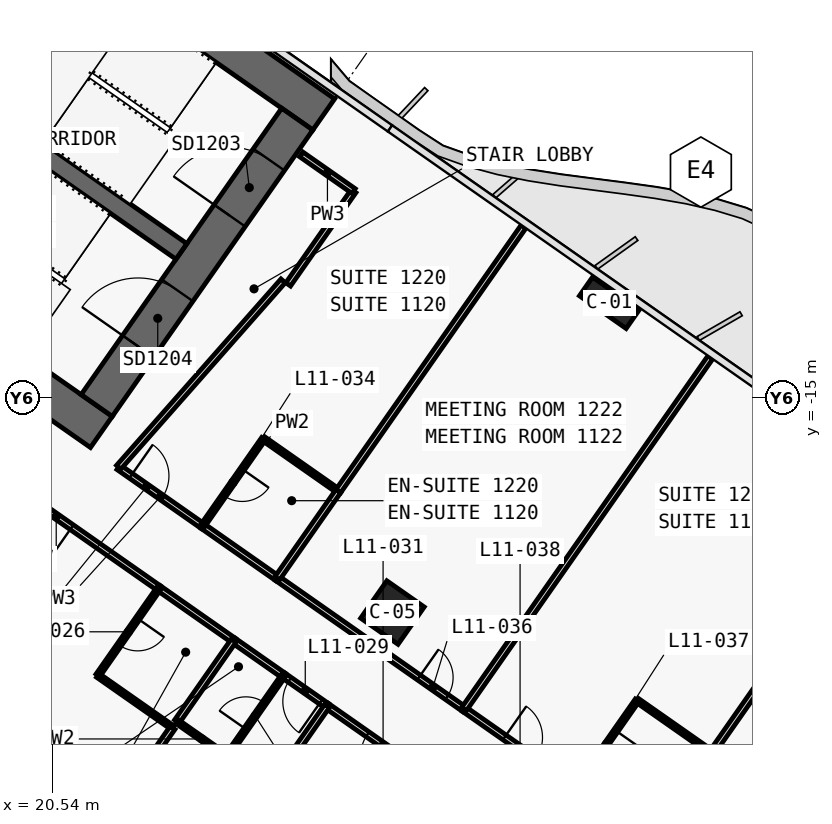
"""IFC4 building model, lengths in metres.
Left out: names, types, materials, properties, quantities, classifications, styles, units other than length and angle.
Written with IfcOpenShell. Run it as: python <this file> out.ifc"""

import sys

from ifc_helpers import new_model, si_unit, direction, frame, frame_2d, origin, origin_2d, place, context, subcontext, project, spatial, polyline, rectangle, outline, extrude, element, fill, save


model = new_model("IFC4")
c1 = context("Model", 3, precision=1e-05, world=origin(), true_north=direction((0.0, 1.0)))
c2 = subcontext(c1, "Body", "Model", "MODEL_VIEW")
j1 = project(units=[si_unit("LENGTHUNIT", "METRE"), si_unit("PLANEANGLEUNIT", "RADIAN")], contexts=[c1])
p1 = place(None, origin())
s1 = spatial("IfcSite", under=j1, at=p1, CompositionType="ELEMENT")
p2 = place(p1, origin())
s2 = spatial("IfcBuilding", under=s1, at=p2, CompositionType="ELEMENT")
p3 = place(p2, frame((0.0, 0.0, 65.3)))
s3 = spatial("IfcBuildingStorey", under=s2, at=p3, CompositionType="ELEMENT", Elevation=65.3)
p4 = place(p3, frame((-0.037, 11.867, 0.0), z_axis=(0.0, 0.0, 1.0), x_axis=(0.819155306259, -0.573571777746, 0.0)))
e1 = element("IfcWall", 1, at=p4, inside=s3, PredefinedType="SHEAR", context=c2, shape_type="SweptSolid", body=[
    extrude(outline(polyline([(33.837, 0.5), (0.0, 0.5), (0.7, -0.5), (33.837, -0.5), (33.837, 0.5)])), origin(), (0.0, 0.0, 1.0), 3.6),
])
p5 = place(p3, frame((-0.037, -0.585, 0.0), z_axis=(0.0, 0.0, 1.0), x_axis=(0.819157152511, -0.573569140985, 0.0)))
e2 = element("IfcWall", 2, at=p5, inside=s3, PredefinedType="SHEAR", context=c2, shape_type="SweptSolid", body=[
    extrude(outline(polyline([(26.695, 0.5), (0.0, 0.5), (0.7, -0.5), (26.695, -0.5), (26.695, 0.5)])), origin(), (0.0, 0.0, 1.0), 3.6),
])
p6 = place(p5, frame((1.245, 0.0, 0.0)))
e3 = element("IfcOpeningElement", 3, at=p6, cuts=e2, PredefinedType="OPENING", context=c2, shape_type="SweptSolid", body=[
    extrude(rectangle(XDim=1.5, YDim=2.1, at=frame_2d((0.75, 1.05))), frame((0.0, 0.51, 0.0), z_axis=(0.0, -1.0, 0.0), x_axis=(1.0, 0.0, 0.0)), (0.0, 0.0, 1.0), 1.02),
])
p7 = place(p5, frame((12.445, 0.0, 0.0)))
e4 = element("IfcOpeningElement", 4, at=p7, cuts=e2, PredefinedType="OPENING", context=c2, shape_type="SweptSolid", body=[
    extrude(rectangle(XDim=1.5, YDim=2.1, at=frame_2d((0.75, 1.05))), frame((0.0, 0.51, 0.0), z_axis=(0.0, -1.0, 0.0), x_axis=(1.0, 0.0, 0.0)), (0.0, 0.0, 1.0), 1.02),
])
p8 = place(p3, frame((21.708, -15.2, 0.0), z_axis=(0.0, 0.0, 1.0), x_axis=(0.573576324356, 0.819152122709, 0.0)))
e5 = element("IfcWall", 5, at=p8, inside=s3, PredefinedType="SHEAR", context=c2, shape_type="SweptSolid", body=[
    extrude(outline(polyline([(9.2, 0.5), (0.0, 0.5), (0.0, -0.5), (9.2, -0.5), (9.2, 0.5)])), origin(), (0.0, 0.0, 1.0), 3.6),
])
p9 = place(p8, frame((6.1, 0.0, 0.0)))
e6 = element("IfcOpeningElement", 6, at=p9, cuts=e5, PredefinedType="OPENING", context=c2, shape_type="SweptSolid", body=[
    extrude(rectangle(XDim=1.8, YDim=2.1, at=frame_2d((0.9, 1.05))), frame((0.0, 0.51, 0.0), z_axis=(0.0, -1.0, 0.0), x_axis=(1.0, 0.0, 0.0)), (0.0, 0.0, 1.0), 1.02),
])
p10 = place(p8, frame((1.9, 0.0, 0.0)))
e7 = element("IfcOpeningElement", 7, at=p10, cuts=e5, PredefinedType="OPENING", context=c2, shape_type="SweptSolid", body=[
    extrude(rectangle(XDim=1.8, YDim=2.1, at=frame_2d((0.9, 1.05))), frame((0.0, 0.51, 0.0), z_axis=(0.0, -1.0, 0.0), x_axis=(1.0, 0.0, 0.0)), (0.0, 0.0, 1.0), 1.02),
])
p11 = place(p3, frame((2.638, 3.768, 0.0), z_axis=(0.0, 0.0, 1.0), x_axis=(0.819148977158, -0.573580816643, 0.0)))
e8 = element("IfcWall", 8, at=p11, inside=s3, PredefinedType="SHEAR", context=c2, shape_type="SweptSolid", body=[
    extrude(outline(polyline([(0.0, 0.25), (0.0, -0.25), (26.0, -0.25), (26.0, 0.25), (0.0, 0.25)])), origin(), (0.0, 0.0, 1.0), 3.6),
])
p12 = place(p11, frame((9.637, 0.0, 0.0)))
e9 = element("IfcOpeningElement", 9, at=p12, cuts=e8, PredefinedType="OPENING", context=c2, shape_type="SweptSolid", body=[
    extrude(rectangle(XDim=1.2, YDim=2.1, at=frame_2d((0.6, 1.05))), frame((0.0, 0.26, 0.0), z_axis=(0.0, -1.0, 0.0), x_axis=(1.0, 0.0, 0.0)), (0.0, 0.0, 1.0), 0.52),
])
p13 = place(p11, frame((11.812, 0.0, 0.0)))
e10 = element("IfcOpeningElement", 10, at=p13, cuts=e8, PredefinedType="OPENING", context=c2, shape_type="SweptSolid", body=[
    extrude(rectangle(XDim=1.2, YDim=2.1, at=frame_2d((0.6, 1.05))), frame((0.0, 0.26, 0.0), z_axis=(0.0, -1.0, 0.0), x_axis=(1.0, 0.0, 0.0)), (0.0, 0.0, 1.0), 0.52),
])
p14 = place(p11, frame((13.988, 0.0, 0.0)))
e11 = element("IfcOpeningElement", 11, at=p14, cuts=e8, PredefinedType="OPENING", context=c2, shape_type="SweptSolid", body=[
    extrude(rectangle(XDim=1.2, YDim=2.1, at=frame_2d((0.6, 1.05))), frame((0.0, 0.26, 0.0), z_axis=(0.0, -1.0, 0.0), x_axis=(1.0, 0.0, 0.0)), (0.0, 0.0, 1.0), 0.52),
])
p15 = place(p11, frame((16.262, 0.0, 0.0)))
e12 = element("IfcOpeningElement", 12, at=p15, cuts=e8, PredefinedType="OPENING", context=c2, shape_type="SweptSolid", body=[
    extrude(rectangle(XDim=1.0, YDim=2.1, at=frame_2d((0.5, 1.05))), frame((0.0, 0.26, 0.0), z_axis=(0.0, -1.0, 0.0), x_axis=(1.0, 0.0, 0.0)), (0.0, 0.0, 1.0), 0.52),
])
p16 = place(p3, frame((35.197, -12.498, 0.0), z_axis=(0.0, 0.0, 1.0), x_axis=(0.819152044289, -0.573576436351, 0.0)))
e13 = element("IfcColumn", 13, at=p16, inside=s3, PredefinedType="COLUMN", context=c2, shape_type="SweptSolid", body=[
    extrude(rectangle(XDim=1.5, YDim=0.6, at=origin_2d()), origin(), (0.0, 0.0, 1.0), 3.6),
])
p17 = place(p3, frame((29.49, -20.649, 0.0), z_axis=(0.0, 0.0, 1.0), x_axis=(0.819152044289, -0.573576436351, 0.0)))
e14 = element("IfcColumn", 14, at=p17, inside=s3, PredefinedType="COLUMN", context=c2, shape_type="SweptSolid", body=[
    extrude(rectangle(XDim=1.2, YDim=1.2, at=origin_2d()), origin(), (0.0, 0.0, 1.0), 3.6),
])
p18 = place(p3, frame((22.284, -16.824, 0.0), z_axis=(0.0, 0.0, 1.0), x_axis=(0.819176640776, -0.573541307325, 0.0)))
e15 = element("IfcWall", 15, at=p18, inside=s3, PredefinedType="PARTITIONING", context=c2, shape_type="SweptSolid", body=[
    extrude(rectangle(XDim=2.698, YDim=0.15, at=frame_2d((1.349, 0.0))), origin(), (0.0, 0.0, 1.0), 3.32),
])
p19 = place(p18, frame((0.396, 0.0, 0.0)))
e16 = element("IfcOpeningElement", 16, at=p19, cuts=e15, PredefinedType="OPENING", context=c2, shape_type="SweptSolid", body=[
    extrude(rectangle(XDim=1.0, YDim=2.1, at=frame_2d((0.5, 1.05))), frame((0.0, 0.085, 0.0), z_axis=(0.0, -1.0, 0.0), x_axis=(1.0, 0.0, 0.0)), (0.0, 0.0, 1.0), 0.17),
])
p20 = place(p3, frame((24.491, -18.369, 0.0), z_axis=(0.0, 0.0, 1.0), x_axis=(0.819179439794, -0.573537309527, 0.0)))
e17 = element("IfcWall", 17, at=p20, inside=s3, PredefinedType="PARTITIONING", context=c2, shape_type="SweptSolid", body=[
    extrude(rectangle(XDim=2.404, YDim=0.15, at=frame_2d((1.202, 0.0))), origin(), (0.0, 0.0, 1.0), 3.32),
])
p21 = place(p3, frame((26.457, -19.746, 0.0), z_axis=(0.0, 0.0, 1.0), x_axis=(0.819165052243, -0.573557858619, 0.0)))
e18 = element("IfcWall", 18, at=p21, inside=s3, PredefinedType="PARTITIONING", context=c2, shape_type="SweptSolid", body=[
    extrude(rectangle(XDim=6.004, YDim=0.15, at=frame_2d((3.002, 0.0))), origin(), (0.0, 0.0, 1.0), 2.6),
])
p22 = place(p21, frame((4.552, 0.0, 0.0)))
e19 = element("IfcOpeningElement", 19, at=p22, cuts=e18, PredefinedType="OPENING", context=c2, shape_type="SweptSolid", body=[
    extrude(rectangle(XDim=0.9, YDim=2.1, at=frame_2d((0.45, 1.05))), frame((0.0, 0.085, 0.0), z_axis=(0.0, -1.0, 0.0), x_axis=(1.0, 0.0, 0.0)), (0.0, 0.0, 1.0), 0.17),
])
p23 = place(p3, frame((31.372, -23.188, 0.0), z_axis=(0.0, 0.0, 1.0), x_axis=(0.819145961204, -0.573585123798, 0.0)))
e20 = element("IfcWall", 20, at=p23, inside=s3, PredefinedType="PARTITIONING", context=c2, shape_type="SweptSolid", body=[
    extrude(rectangle(XDim=3.603, YDim=0.15, at=frame_2d((1.802, 0.0))), origin(), (0.0, 0.0, 1.0), 3.32),
])
p24 = place(p23, frame((1.302, 0.0, 0.0)))
e21 = element("IfcOpeningElement", 21, at=p24, cuts=e20, PredefinedType="OPENING", context=c2, shape_type="SweptSolid", body=[
    extrude(rectangle(XDim=1.0, YDim=2.1, at=frame_2d((0.5, 1.05))), frame((0.0, 0.085, 0.0), z_axis=(0.0, -1.0, 0.0), x_axis=(1.0, 0.0, 0.0)), (0.0, 0.0, 1.0), 0.17),
])
p25 = place(p3, frame((23.346, -20.01, 0.0), z_axis=(0.0, 0.0, 1.0), x_axis=(-0.819153746897, 0.573574004767, 0.0)))
e22 = element("IfcWall", 22, at=p25, inside=s3, PredefinedType="PARTITIONING", context=c2, shape_type="SweptSolid", body=[
    extrude(rectangle(XDim=6.603, YDim=0.15, at=frame_2d((3.302, 0.0))), origin(), (0.0, 0.0, 1.0), 2.6),
])
p26 = place(p25, frame((2.801, 0.0, 0.0)))
e23 = element("IfcOpeningElement", 23, at=p26, cuts=e22, PredefinedType="OPENING", context=c2, shape_type="SweptSolid", body=[
    extrude(rectangle(XDim=1.0, YDim=2.1, at=frame_2d((0.5, 1.05))), frame((0.0, 0.085, 0.0), z_axis=(0.0, -1.0, 0.0), x_axis=(1.0, 0.0, 0.0)), (0.0, 0.0, 1.0), 0.17),
])
p27 = place(p3, frame((25.313, -21.387, 0.0), z_axis=(0.0, 0.0, 1.0), x_axis=(-0.819146032251, 0.573585022335, 0.0)))
e24 = element("IfcWall", 24, at=p27, inside=s3, PredefinedType="PARTITIONING", context=c2, shape_type="SweptSolid", body=[
    extrude(rectangle(XDim=2.404, YDim=0.15, at=frame_2d((1.202, 0.0))), origin(), (0.0, 0.0, 1.0), 3.32),
])
p28 = place(p3, frame((27.771, -23.107, 0.0), z_axis=(0.0, 0.0, 1.0), x_axis=(-0.819117471667, 0.573625808005, 0.0)))
e25 = element("IfcWall", 25, at=p28, inside=s3, PredefinedType="PARTITIONING", context=c2, shape_type="SweptSolid", body=[
    extrude(rectangle(XDim=1.403, YDim=0.15, at=frame_2d((0.702, 0.0))), origin(), (0.0, 0.0, 1.0), 2.6),
])
p29 = place(p28, frame((0.202, 0.0, 0.0)))
e26 = element("IfcOpeningElement", 26, at=p29, cuts=e25, PredefinedType="OPENING", context=c2, shape_type="SweptSolid", body=[
    extrude(rectangle(XDim=1.0, YDim=2.1, at=frame_2d((0.5, 1.05))), frame((0.0, 0.085, 0.0), z_axis=(0.0, -1.0, 0.0), x_axis=(1.0, 0.0, 0.0)), (0.0, 0.0, 1.0), 0.17),
])
p30 = place(p3, frame((26.624, -22.304, 0.0), z_axis=(0.0, 0.0, 1.0), x_axis=(-0.819189013667, 0.573523634986, 0.0)))
e27 = element("IfcWall", 27, at=p30, inside=s3, PredefinedType="PARTITIONING", context=c2, shape_type="SweptSolid", body=[
    extrude(rectangle(XDim=1.604, YDim=0.15, at=frame_2d((0.802, 0.0))), origin(), (0.0, 0.0, 1.0), 3.32),
])
p31 = place(p3, frame((30.719, -25.172, 0.0), z_axis=(0.0, 0.0, 1.0), x_axis=(-0.819145961204, 0.573585123798, 0.0)))
e28 = element("IfcWall", 28, at=p31, inside=s3, PredefinedType="PARTITIONING", context=c2, shape_type="SweptSolid", body=[
    extrude(rectangle(XDim=3.603, YDim=0.15, at=frame_2d((1.802, 0.0))), origin(), (0.0, 0.0, 1.0), 2.6),
])
p32 = place(p31, frame((1.301, 0.0, 0.0)))
e29 = element("IfcOpeningElement", 29, at=p32, cuts=e28, PredefinedType="OPENING", context=c2, shape_type="SweptSolid", body=[
    extrude(rectangle(XDim=1.0, YDim=2.1, at=frame_2d((0.5, 1.05))), frame((0.0, 0.085, 0.0), z_axis=(0.0, -1.0, 0.0), x_axis=(1.0, 0.0, 0.0)), (0.0, 0.0, 1.0), 0.17),
])
p33 = place(p3, frame((26.098, -16.076, 0.0), z_axis=(0.0, 0.0, 1.0), x_axis=(-0.573550118428, -0.819170471667, 0.0)))
e30 = element("IfcWall", 30, at=p33, inside=s3, PredefinedType="PARTITIONING", context=c2, shape_type="SweptSolid", body=[
    extrude(rectangle(XDim=2.8, YDim=0.12, at=frame_2d((1.4, 0.0))), origin(), (0.0, 0.0, 1.0), 2.6),
])
p34 = place(p33, frame((0.975, 0.0, 0.0)))
e31 = element("IfcOpeningElement", 31, at=p34, cuts=e30, PredefinedType="OPENING", context=c2, shape_type="SweptSolid", body=[
    extrude(rectangle(XDim=0.85, YDim=2.05, at=frame_2d((0.425, 1.025))), frame((0.0, 0.07, 0.0), z_axis=(0.0, -1.0, 0.0), x_axis=(1.0, 0.0, 0.0)), (0.0, 0.0, 1.0), 0.14),
])
p35 = place(p3, frame((28.065, -17.453, 0.0), z_axis=(0.0, 0.0, 1.0), x_axis=(-0.819155442668, 0.573571582932, 0.0)))
e32 = element("IfcWall", 32, at=p35, inside=s3, PredefinedType="PARTITIONING", context=c2, shape_type="SweptSolid", body=[
    extrude(rectangle(XDim=2.4, YDim=0.12, at=frame_2d((1.2, 0.0))), origin(), (0.0, 0.0, 1.0), 3.32),
])
p36 = place(p3, frame((32.94, -10.491, 0.0), z_axis=(0.0, 0.0, 1.0), x_axis=(-0.573593433868, -0.819140142237, 0.0)))
e33 = element("IfcWall", 33, at=p36, inside=s3, PredefinedType="PARTITIONING", context=c2, shape_type="SweptSolid", body=[
    extrude(rectangle(XDim=8.499, YDim=0.15, at=frame_2d((4.25, 0.0))), origin(), (0.0, 0.0, 1.0), 2.6),
])
p37 = place(p3, frame((22.285, -16.825, 0.0), z_axis=(0.0, 0.0, 1.0), x_axis=(0.661551268245, 0.749899939647, 0.0)))
e34 = element("IfcWall", 34, at=p37, inside=s3, PredefinedType="PARTITIONING", context=c2, shape_type="SweptSolid", body=[
    extrude(rectangle(XDim=6.541, YDim=0.15, at=frame_2d((3.271, 0.0))), origin(), (0.0, 0.0, 1.0), 2.6),
])
p38 = place(p3, frame((26.746, -12.014, 0.0), z_axis=(0.0, 0.0, 1.0), x_axis=(0.573560650686, 0.819163097304, 0.0)))
e35 = element("IfcWall", 35, at=p38, inside=s3, PredefinedType="PARTITIONING", context=c2, shape_type="SweptSolid", body=[
    extrude(rectangle(XDim=3.0, YDim=0.15, at=frame_2d((1.5, 0.0))), origin(), (0.0, 0.0, 1.0), 3.32),
])
p39 = place(p3, frame((28.467, -9.556, 0.0), z_axis=(0.0, 0.0, 1.0), x_axis=(-0.819109000826, 0.573637903879, 0.0)))
e36 = element("IfcWall", 36, at=p39, inside=s3, PredefinedType="PARTITIONING", context=c2, shape_type="SweptSolid", body=[
    extrude(rectangle(XDim=1.68, YDim=0.15, at=frame_2d((0.84, 0.0))), origin(), (0.0, 0.0, 1.0), 3.32),
])
p40 = place(p3, frame((28.064, -17.454, 0.0), z_axis=(0.0, 0.0, 1.0), x_axis=(-0.573550118428, -0.819170471667, 0.0)))
e37 = element("IfcWall", 37, at=p40, inside=s3, PredefinedType="PARTITIONING", context=c2, shape_type="SweptSolid", body=[
    extrude(rectangle(XDim=2.8, YDim=0.15, at=frame_2d((1.4, 0.0))), origin(), (0.0, 0.0, 1.0), 2.6),
])
p41 = place(p3, frame((37.855, -13.932, 0.0), z_axis=(0.0, 0.0, 1.0), x_axis=(-0.573571089604, -0.819155788095, 0.0)))
e38 = element("IfcWall", 38, at=p41, inside=s3, PredefinedType="PARTITIONING", context=c2, shape_type="SweptSolid", body=[
    extrude(rectangle(XDim=11.3, YDim=0.15, at=frame_2d((5.65, 0.0))), origin(), (0.0, 0.0, 1.0), 2.5),
])
p42 = place(p3, frame((37.895, -24.336, 0.0), z_axis=(0.0, 0.0, 1.0), x_axis=(-0.819141114317, 0.573592045652, 0.0)))
e39 = element("IfcWall", 39, at=p42, inside=s3, PredefinedType="PARTITIONING", context=c2, shape_type="SweptSolid", body=[
    extrude(rectangle(XDim=2.4, YDim=0.12, at=frame_2d((1.2, 0.0))), origin(), (0.0, 0.0, 1.0), 3.32),
])
p43 = place(p3, frame((35.927, -22.959, 0.0), z_axis=(0.0, 0.0, 1.0), x_axis=(-0.573550118428, -0.819170471667, 0.0)))
e40 = element("IfcWall", 40, at=p43, inside=s3, PredefinedType="PARTITIONING", context=c2, shape_type="SweptSolid", body=[
    extrude(rectangle(XDim=2.8, YDim=0.12, at=frame_2d((1.4, 0.0))), origin(), (0.0, 0.0, 1.0), 2.6),
])
p44 = place(p43, frame((0.975, 0.0, 0.0)))
e41 = element("IfcOpeningElement", 41, at=p44, cuts=e40, PredefinedType="OPENING", context=c2, shape_type="SweptSolid", body=[
    extrude(rectangle(XDim=0.85, YDim=2.05, at=frame_2d((0.425, 1.025))), frame((0.0, 0.07, 0.0), z_axis=(0.0, -1.0, 0.0), x_axis=(1.0, 0.0, 0.0)), (0.0, 0.0, 1.0), 0.14),
])
p45 = place(p3, frame((41.049, -19.831, 0.0), z_axis=(0.0, 0.0, 1.0), x_axis=(-0.573530875885, -0.819183944183, 0.0)))
e42 = element("IfcWall", 42, at=p45, inside=s3, PredefinedType="PARTITIONING", context=c2, shape_type="SweptSolid", body=[
    extrude(rectangle(XDim=5.499, YDim=0.15, at=frame_2d((2.75, 0.0))), origin(), (0.0, 0.0, 1.0), 3.32),
])
p46 = place(p3, frame((23.344, -20.008, 0.0), z_axis=(0.0, 0.0, 1.0), x_axis=(-0.573550118428, -0.819170471667, 0.0)))
e43 = element("IfcWall", 43, at=p46, inside=s3, PredefinedType="PARTITIONING", context=c2, shape_type="SweptSolid", body=[
    extrude(rectangle(XDim=2.8, YDim=0.12, at=frame_2d((1.4, 0.0))), origin(), (0.0, 0.0, 1.0), 3.32),
])
p47 = place(p46, frame((0.975, 0.0, 0.0)))
e44 = element("IfcOpeningElement", 44, at=p47, cuts=e43, PredefinedType="OPENING", context=c2, shape_type="SweptSolid", body=[
    extrude(rectangle(XDim=0.85, YDim=2.05, at=frame_2d((0.425, 1.025))), frame((0.0, 0.07, 0.0), z_axis=(0.0, -1.0, 0.0), x_axis=(1.0, 0.0, 0.0)), (0.0, 0.0, 1.0), 0.14),
])
p48 = place(p3, frame((21.739, -22.303, 0.0), z_axis=(0.0, 0.0, 1.0), x_axis=(0.819107643868, -0.573639841501, 0.0)))
e45 = element("IfcWall", 45, at=p48, inside=s3, PredefinedType="PARTITIONING", context=c2, shape_type="SweptSolid", body=[
    extrude(rectangle(XDim=2.4, YDim=0.12, at=frame_2d((1.2, 0.0))), origin(), (0.0, 0.0, 1.0), 3.32),
])
p49 = place(p3, frame((23.705, -23.68, 0.0), z_axis=(0.0, 0.0, 1.0), x_axis=(-0.573553393703, -0.819168178442, 0.0)))
e46 = element("IfcWall", 46, at=p49, inside=s3, PredefinedType="PARTITIONING", context=c2, shape_type="SweptSolid", body=[
    extrude(rectangle(XDim=4.499, YDim=0.15, at=frame_2d((2.25, 0.0))), origin(), (0.0, 0.0, 1.0), 2.5),
])
p50 = place(p3, frame((25.311, -21.385, 0.0), z_axis=(0.0, 0.0, 1.0), x_axis=(-0.573588285102, -0.819143747577, 0.0)))
e47 = element("IfcWall", 47, at=p50, inside=s3, PredefinedType="PARTITIONING", context=c2, shape_type="SweptSolid", body=[
    extrude(rectangle(XDim=2.602, YDim=0.15, at=frame_2d((1.301, 0.0))), origin(), (0.0, 0.0, 1.0), 3.32),
])
p51 = place(p3, frame((23.819, -23.516, 0.0), z_axis=(0.0, 0.0, 1.0), x_axis=(0.81918174131, -0.573534022273, 0.0)))
e48 = element("IfcWall", 48, at=p51, inside=s3, PredefinedType="PARTITIONING", context=c2, shape_type="SweptSolid", body=[
    extrude(rectangle(XDim=1.6, YDim=0.12, at=frame_2d((0.8, 0.0))), origin(), (0.0, 0.0, 1.0), 3.32),
])
p52 = place(p3, frame((25.132, -24.434, 0.0), z_axis=(0.0, 0.0, 1.0), x_axis=(0.573537965655, 0.819178980414, 0.0)))
e49 = element("IfcWall", 49, at=p52, inside=s3, PredefinedType="PARTITIONING", context=c2, shape_type="SweptSolid", body=[
    extrude(rectangle(XDim=2.6, YDim=0.12, at=frame_2d((1.3, 0.0))), origin(), (0.0, 0.0, 1.0), 3.32),
])
p53 = place(p52, frame((0.875, 0.0, 0.0)))
e50 = element("IfcOpeningElement", 50, at=p53, cuts=e49, PredefinedType="OPENING", context=c2, shape_type="SweptSolid", body=[
    extrude(rectangle(XDim=0.85, YDim=2.05, at=frame_2d((0.425, 1.025))), frame((0.0, 0.07, 0.0), z_axis=(0.0, -1.0, 0.0), x_axis=(1.0, 0.0, 0.0)), (0.0, 0.0, 1.0), 0.14),
])
p54 = place(p3, frame((27.769, -23.106, 0.0), z_axis=(0.0, 0.0, 1.0), x_axis=(-0.57359826181, -0.819136761505, 0.0)))
e51 = element("IfcWall", 51, at=p54, inside=s3, PredefinedType="PARTITIONING", context=c2, shape_type="SweptSolid", body=[
    extrude(rectangle(XDim=6.63, YDim=0.15, at=frame_2d((3.315, 0.0))), origin(), (0.0, 0.0, 1.0), 2.6),
])
p55 = place(p9, origin())
e52 = element("IfcDoor", 52, at=p55, inside=s3, OperationType="DOUBLE_DOOR_SINGLE_SWING", PredefinedType="DOOR", context=c2, shape_type="SweptSolid", body=[
    extrude(rectangle(XDim=1.8, YDim=2.1, at=frame_2d((0.9, 1.05))), frame((0.0, 0.025, 0.0), z_axis=(0.0, -1.0, 0.0), x_axis=(1.0, 0.0, 0.0)), (0.0, 0.0, 1.0), 0.05),
])
fill(e6, e52)
p56 = place(p10, origin())
e53 = element("IfcDoor", 53, at=p56, inside=s3, OperationType="DOUBLE_DOOR_SINGLE_SWING", PredefinedType="DOOR", context=c2, shape_type="SweptSolid", body=[
    extrude(rectangle(XDim=1.8, YDim=2.1, at=frame_2d((0.9, 1.05))), frame((0.0, 0.025, 0.0), z_axis=(0.0, -1.0, 0.0), x_axis=(1.0, 0.0, 0.0)), (0.0, 0.0, 1.0), 0.05),
])
fill(e7, e53)
p57 = place(p47, origin())
e54 = element("IfcDoor", 54, at=p57, inside=s3, OperationType="SINGLE_SWING_RIGHT", PredefinedType="DOOR", context=c2, shape_type="SweptSolid", body=[
    extrude(rectangle(XDim=0.85, YDim=2.05, at=frame_2d((0.425, 1.025))), frame((0.0, 0.025, 0.0), z_axis=(0.0, -1.0, 0.0), x_axis=(1.0, 0.0, 0.0)), (0.0, 0.0, 1.0), 0.05),
])
fill(e44, e54)
p58 = place(p26, origin())
e55 = element("IfcDoor", 55, at=p58, inside=s3, OperationType="SINGLE_SWING_RIGHT", PredefinedType="DOOR", context=c2, shape_type="SweptSolid", body=[
    extrude(rectangle(XDim=1.0, YDim=2.1, at=frame_2d((0.5, 1.05))), frame((0.0, 0.025, 0.0), z_axis=(0.0, -1.0, 0.0), x_axis=(1.0, 0.0, 0.0)), (0.0, 0.0, 1.0), 0.05),
])
fill(e23, e55)
p59 = place(p53, origin())
e56 = element("IfcDoor", 56, at=p59, inside=s3, OperationType="SINGLE_SWING_LEFT", PredefinedType="DOOR", context=c2, shape_type="SweptSolid", body=[
    extrude(rectangle(XDim=0.85, YDim=2.05, at=frame_2d((0.425, 1.025))), frame((0.0, 0.025, 0.0), z_axis=(0.0, -1.0, 0.0), x_axis=(1.0, 0.0, 0.0)), (0.0, 0.0, 1.0), 0.05),
])
fill(e50, e56)
p60 = place(p29, origin())
e57 = element("IfcDoor", 57, at=p60, inside=s3, OperationType="SINGLE_SWING_RIGHT", PredefinedType="DOOR", context=c2, shape_type="SweptSolid", body=[
    extrude(rectangle(XDim=1.0, YDim=2.1, at=frame_2d((0.5, 1.05))), frame((0.0, 0.025, 0.0), z_axis=(0.0, -1.0, 0.0), x_axis=(1.0, 0.0, 0.0)), (0.0, 0.0, 1.0), 0.05),
])
fill(e26, e57)
p61 = place(p32, origin())
e58 = element("IfcDoor", 58, at=p61, inside=s3, OperationType="SINGLE_SWING_LEFT", PredefinedType="DOOR", context=c2, shape_type="SweptSolid", body=[
    extrude(rectangle(XDim=1.0, YDim=2.1, at=frame_2d((0.5, 1.05))), frame((0.0, 0.025, 0.0), z_axis=(0.0, -1.0, 0.0), x_axis=(1.0, 0.0, 0.0)), (0.0, 0.0, 1.0), 0.05),
])
fill(e29, e58)
p62 = place(p34, origin())
e59 = element("IfcDoor", 59, at=p62, inside=s3, OperationType="SINGLE_SWING_RIGHT", PredefinedType="DOOR", context=c2, shape_type="SweptSolid", body=[
    extrude(rectangle(XDim=0.85, YDim=2.05, at=frame_2d((0.425, 1.025))), frame((0.0, 0.025, 0.0), z_axis=(0.0, -1.0, 0.0), x_axis=(1.0, 0.0, 0.0)), (0.0, 0.0, 1.0), 0.05),
])
fill(e31, e59)
p63 = place(p19, origin())
e60 = element("IfcDoor", 60, at=p63, inside=s3, OperationType="SINGLE_SWING_LEFT", PredefinedType="DOOR", context=c2, shape_type="SweptSolid", body=[
    extrude(rectangle(XDim=1.0, YDim=2.1, at=frame_2d((0.5, 1.05))), frame((0.0, 0.025, 0.0), z_axis=(0.0, -1.0, 0.0), x_axis=(1.0, 0.0, 0.0)), (0.0, 0.0, 1.0), 0.05),
])
fill(e16, e60)
p64 = place(p22, origin())
e61 = element("IfcDoor", 61, at=p64, inside=s3, OperationType="SINGLE_SWING_RIGHT", PredefinedType="DOOR", context=c2, shape_type="SweptSolid", body=[
    extrude(rectangle(XDim=0.9, YDim=2.1, at=frame_2d((0.45, 1.05))), frame((0.0, 0.025, 0.0), z_axis=(0.0, -1.0, 0.0), x_axis=(1.0, 0.0, 0.0)), (0.0, 0.0, 1.0), 0.05),
])
fill(e19, e61)
p65 = place(p44, origin())
e62 = element("IfcDoor", 62, at=p65, inside=s3, OperationType="SINGLE_SWING_LEFT", PredefinedType="DOOR", context=c2, shape_type="SweptSolid", body=[
    extrude(rectangle(XDim=0.85, YDim=2.05, at=frame_2d((0.425, 1.025))), frame((0.0, 0.025, 0.0), z_axis=(0.0, -1.0, 0.0), x_axis=(1.0, 0.0, 0.0)), (0.0, 0.0, 1.0), 0.05),
])
fill(e41, e62)
p66 = place(p24, origin())
e63 = element("IfcDoor", 63, at=p66, inside=s3, OperationType="SINGLE_SWING_RIGHT", PredefinedType="DOOR", context=c2, shape_type="SweptSolid", body=[
    extrude(rectangle(XDim=1.0, YDim=2.1, at=frame_2d((0.5, 1.05))), frame((0.0, 0.025, 0.0), z_axis=(0.0, -1.0, 0.0), x_axis=(1.0, 0.0, 0.0)), (0.0, 0.0, 1.0), 0.05),
])
fill(e21, e63)
save(model, sys.argv[1])
